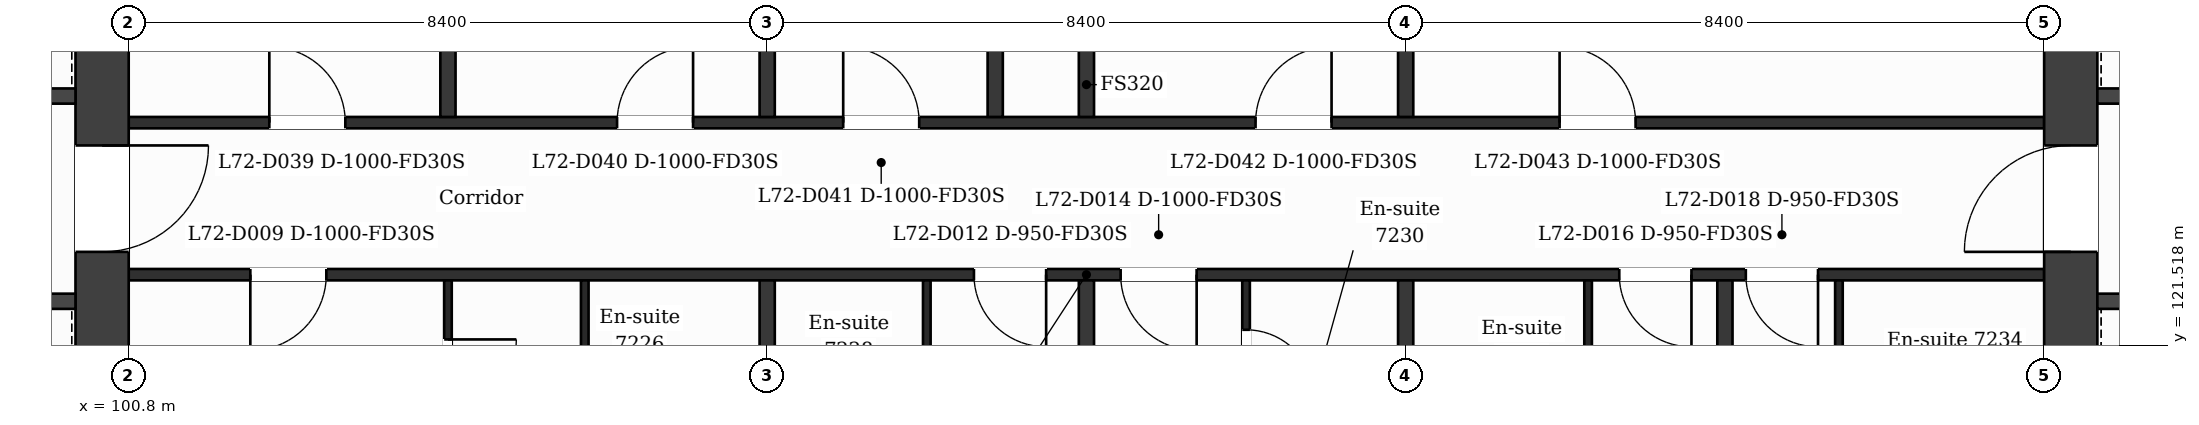
"""IFC4 building model, lengths in metres.
Left out: names, types, materials, properties, quantities, classifications, styles, units other than length and angle.
Written with IfcOpenShell. Run it as: python <this file> out.ifc"""

import sys

from ifc_helpers import new_model, si_unit, direction, frame, frame_2d, origin, place, context, subcontext, project, spatial, rectangle, extrude, element, fill, save


model = new_model("IFC4")
c1 = context("Model", 3, precision=1e-05, world=origin(), true_north=direction((0.0, 1.0)))
c2 = subcontext(c1, "Body", "Model", "MODEL_VIEW")
j1 = project(units=[si_unit("LENGTHUNIT", "METRE"), si_unit("PLANEANGLEUNIT", "RADIAN")], contexts=[c1])
p1 = place(None, origin())
s1 = spatial("IfcSite", under=j1, at=p1, CompositionType="ELEMENT")
p2 = place(p1, origin())
s2 = spatial("IfcBuilding", under=s1, at=p2, CompositionType="ELEMENT")
p3 = place(p2, frame((0.0, 0.0, 296.0)))
s3 = spatial("IfcBuildingStorey", under=s2, at=p3, CompositionType="ELEMENT", Elevation=296.0)
p4 = place(p3, frame((100.45, 132.05, 0.0), z_axis=(0.0, 0.0, 1.0), x_axis=(0.0, -1.0, 0.0)))
e1 = element("IfcWall", 1, at=p4, inside=s3, PredefinedType="SHEAR", context=c2, shape_type="SweptSolid", body=[
    extrude(rectangle(XDim=15.7, YDim=0.7, at=frame_2d((7.85, 0.0))), origin(), (0.0, 0.0, 1.0), 3.7),
])
p5 = place(p4, frame((7.9, 0.0, 0.0)))
e2 = element("IfcOpeningElement", 2, at=p5, cuts=e1, PredefinedType="OPENING", context=c2, shape_type="SweptSolid", body=[
    extrude(rectangle(XDim=1.4, YDim=2.1, at=frame_2d((0.7, 1.05))), frame((0.0, 0.36, 0.0), z_axis=(0.0, -1.0, 0.0), x_axis=(1.0, 0.0, 0.0)), (0.0, 0.0, 1.0), 0.72),
])
p6 = place(p3, frame((126.35, 116.35, 0.0), z_axis=(0.0, 0.0, 1.0), x_axis=(0.0, 1.0, 0.0)))
e3 = element("IfcWall", 3, at=p6, inside=s3, PredefinedType="SHEAR", context=c2, shape_type="SweptSolid", body=[
    extrude(rectangle(XDim=15.7, YDim=0.7, at=frame_2d((7.85, 0.0))), origin(), (0.0, 0.0, 1.0), 3.7),
])
p7 = place(p6, frame((6.4, 0.0, 0.0)))
e4 = element("IfcOpeningElement", 4, at=p7, cuts=e3, PredefinedType="OPENING", context=c2, shape_type="SweptSolid", body=[
    extrude(rectangle(XDim=1.4, YDim=2.1, at=frame_2d((0.7, 1.05))), frame((0.0, 0.36, 0.0), z_axis=(0.0, -1.0, 0.0), x_axis=(1.0, 0.0, 0.0)), (0.0, 0.0, 1.0), 0.72),
])
p8 = place(p3, frame((95.227, 122.1, 0.0), z_axis=(0.0, 0.0, 1.0), x_axis=(1.0, 0.0, 0.0)))
e5 = element("IfcWall", 5, at=p8, inside=s3, PredefinedType="PARTITIONING", context=c2, shape_type="SweptSolid", body=[
    extrude(rectangle(XDim=4.873, YDim=0.2, at=frame_2d((2.437, 0.0))), origin(), (0.0, 0.0, 1.0), 3.38),
])
p9 = place(p8, frame((0.732, 0.0, 0.0)))
e6 = element("IfcOpeningElement", 6, at=p9, cuts=e5, PredefinedType="OPENING", context=c2, shape_type="SweptSolid", body=[
    extrude(rectangle(XDim=1.1, YDim=2.1, at=frame_2d((0.55, 1.05))), frame((0.0, 0.11, 0.0), z_axis=(0.0, -1.0, 0.0), x_axis=(1.0, 0.0, 0.0)), (0.0, 0.0, 1.0), 0.22),
])
p10 = place(p8, frame((3.264, 0.0, 0.0)))
e7 = element("IfcOpeningElement", 7, at=p10, cuts=e5, PredefinedType="OPENING", context=c2, shape_type="SweptSolid", body=[
    extrude(rectangle(XDim=1.1, YDim=2.1, at=frame_2d((0.55, 1.05))), frame((0.0, 0.11, 0.0), z_axis=(0.0, -1.0, 0.0), x_axis=(1.0, 0.0, 0.0)), (0.0, 0.0, 1.0), 0.22),
])
p11 = place(p3, frame((126.7, 122.1, 0.0), z_axis=(0.0, 0.0, 1.0), x_axis=(1.0, 0.0, 0.0)))
e8 = element("IfcWall", 8, at=p11, inside=s3, PredefinedType="PARTITIONING", context=c2, shape_type="SweptSolid", body=[
    extrude(rectangle(XDim=4.873, YDim=0.2, at=frame_2d((2.437, 0.0))), origin(), (0.0, 0.0, 1.0), 3.38),
])
p12 = place(p11, frame((3.264, 0.0, 0.0)))
e9 = element("IfcOpeningElement", 9, at=p12, cuts=e8, PredefinedType="OPENING", context=c2, shape_type="SweptSolid", body=[
    extrude(rectangle(XDim=1.1, YDim=2.1, at=frame_2d((0.55, 1.05))), frame((0.0, 0.11, 0.0), z_axis=(0.0, -1.0, 0.0), x_axis=(1.0, 0.0, 0.0)), (0.0, 0.0, 1.0), 0.22),
])
p13 = place(p11, frame((0.827, 0.0, 0.0)))
e10 = element("IfcOpeningElement", 10, at=p13, cuts=e8, PredefinedType="OPENING", context=c2, shape_type="SweptSolid", body=[
    extrude(rectangle(XDim=1.1, YDim=2.1, at=frame_2d((0.55, 1.05))), frame((0.0, 0.11, 0.0), z_axis=(0.0, -1.0, 0.0), x_axis=(1.0, 0.0, 0.0)), (0.0, 0.0, 1.0), 0.22),
])
p14 = place(p3, frame((100.8, 122.45, 0.0), z_axis=(0.0, 0.0, 1.0), x_axis=(1.0, 0.0, 0.0)))
e11 = element("IfcWall", 11, at=p14, inside=s3, PredefinedType="PARTITIONING", context=c2, shape_type="SweptSolid", body=[
    extrude(rectangle(XDim=25.2, YDim=0.15, at=frame_2d((12.6, 0.0))), origin(), (0.0, 0.0, 1.0), 3.38),
])
p15 = place(p14, frame((1.6, 0.0, 0.0)))
e12 = element("IfcOpeningElement", 12, at=p15, cuts=e11, PredefinedType="OPENING", context=c2, shape_type="SweptSolid", body=[
    extrude(rectangle(XDim=1.0, YDim=2.1, at=frame_2d((0.5, 1.05))), frame((0.0, 0.085, 0.0), z_axis=(0.0, -1.0, 0.0), x_axis=(1.0, 0.0, 0.0)), (0.0, 0.0, 1.0), 0.17),
])
p16 = place(p14, frame((11.12, 0.0, 0.0)))
e13 = element("IfcOpeningElement", 13, at=p16, cuts=e11, PredefinedType="OPENING", context=c2, shape_type="SweptSolid", body=[
    extrude(rectangle(XDim=0.95, YDim=2.1, at=frame_2d((0.475, 1.05))), frame((0.0, 0.085, 0.0), z_axis=(0.0, -1.0, 0.0), x_axis=(1.0, 0.0, 0.0)), (0.0, 0.0, 1.0), 0.17),
])
p17 = place(p14, frame((13.05, 0.0, 0.0)))
e14 = element("IfcOpeningElement", 14, at=p17, cuts=e11, PredefinedType="OPENING", context=c2, shape_type="SweptSolid", body=[
    extrude(rectangle(XDim=1.0, YDim=2.1, at=frame_2d((0.5, 1.05))), frame((0.0, 0.085, 0.0), z_axis=(0.0, -1.0, 0.0), x_axis=(1.0, 0.0, 0.0)), (0.0, 0.0, 1.0), 0.17),
])
p18 = place(p14, frame((19.61, 0.0, 0.0)))
e15 = element("IfcOpeningElement", 15, at=p18, cuts=e11, PredefinedType="OPENING", context=c2, shape_type="SweptSolid", body=[
    extrude(rectangle(XDim=0.95, YDim=2.1, at=frame_2d((0.475, 1.05))), frame((0.0, 0.085, 0.0), z_axis=(0.0, -1.0, 0.0), x_axis=(1.0, 0.0, 0.0)), (0.0, 0.0, 1.0), 0.17),
])
p19 = place(p14, frame((21.275, 0.0, 0.0)))
e16 = element("IfcOpeningElement", 16, at=p19, cuts=e11, PredefinedType="OPENING", context=c2, shape_type="SweptSolid", body=[
    extrude(rectangle(XDim=0.95, YDim=2.1, at=frame_2d((0.475, 1.05))), frame((0.0, 0.085, 0.0), z_axis=(0.0, -1.0, 0.0), x_axis=(1.0, 0.0, 0.0)), (0.0, 0.0, 1.0), 0.17),
])
p20 = place(p3, frame((100.8, 124.45, 0.0), z_axis=(0.0, 0.0, 1.0), x_axis=(1.0, 0.0, 0.0)))
e17 = element("IfcWall", 17, at=p20, inside=s3, PredefinedType="PARTITIONING", context=c2, shape_type="SweptSolid", body=[
    extrude(rectangle(XDim=25.2, YDim=0.15, at=frame_2d((12.6, 0.0))), origin(), (0.0, 0.0, 1.0), 3.38),
])
p21 = place(p20, frame((1.85, 0.0, 0.0)))
e18 = element("IfcOpeningElement", 18, at=p21, cuts=e17, PredefinedType="OPENING", context=c2, shape_type="SweptSolid", body=[
    extrude(rectangle(XDim=1.0, YDim=2.1, at=frame_2d((0.5, 1.05))), frame((0.0, 0.085, 0.0), z_axis=(0.0, -1.0, 0.0), x_axis=(1.0, 0.0, 0.0)), (0.0, 0.0, 1.0), 0.17),
])
p22 = place(p20, frame((6.425, 0.0, 0.0)))
e19 = element("IfcOpeningElement", 19, at=p22, cuts=e17, PredefinedType="OPENING", context=c2, shape_type="SweptSolid", body=[
    extrude(rectangle(XDim=1.0, YDim=2.1, at=frame_2d((0.5, 1.05))), frame((0.0, 0.085, 0.0), z_axis=(0.0, -1.0, 0.0), x_axis=(1.0, 0.0, 0.0)), (0.0, 0.0, 1.0), 0.17),
])
p23 = place(p20, frame((9.4, 0.0, 0.0)))
e20 = element("IfcOpeningElement", 20, at=p23, cuts=e17, PredefinedType="OPENING", context=c2, shape_type="SweptSolid", body=[
    extrude(rectangle(XDim=1.0, YDim=2.1, at=frame_2d((0.5, 1.05))), frame((0.0, 0.085, 0.0), z_axis=(0.0, -1.0, 0.0), x_axis=(1.0, 0.0, 0.0)), (0.0, 0.0, 1.0), 0.17),
])
p24 = place(p20, frame((14.825, 0.0, 0.0)))
e21 = element("IfcOpeningElement", 21, at=p24, cuts=e17, PredefinedType="OPENING", context=c2, shape_type="SweptSolid", body=[
    extrude(rectangle(XDim=1.0, YDim=2.1, at=frame_2d((0.5, 1.05))), frame((0.0, 0.085, 0.0), z_axis=(0.0, -1.0, 0.0), x_axis=(1.0, 0.0, 0.0)), (0.0, 0.0, 1.0), 0.17),
])
p25 = place(p20, frame((18.825, 0.0, 0.0)))
e22 = element("IfcOpeningElement", 22, at=p25, cuts=e17, PredefinedType="OPENING", context=c2, shape_type="SweptSolid", body=[
    extrude(rectangle(XDim=1.0, YDim=2.1, at=frame_2d((0.5, 1.05))), frame((0.0, 0.085, 0.0), z_axis=(0.0, -1.0, 0.0), x_axis=(1.0, 0.0, 0.0)), (0.0, 0.0, 1.0), 0.17),
])
p26 = place(p3, frame((92.702, 124.8, 0.0), z_axis=(0.0, 0.0, 1.0), x_axis=(1.0, 0.0, 0.0)))
e23 = element("IfcWall", 23, at=p26, inside=s3, PredefinedType="PARTITIONING", context=c2, shape_type="SweptSolid", body=[
    extrude(rectangle(XDim=7.398, YDim=0.2, at=frame_2d((3.699, 0.0))), origin(), (0.0, 0.0, 1.0), 3.38),
])
p27 = place(p26, frame((5.48, 0.0, 0.0)))
e24 = element("IfcOpeningElement", 24, at=p27, cuts=e23, PredefinedType="OPENING", context=c2, shape_type="SweptSolid", body=[
    extrude(rectangle(XDim=1.1, YDim=2.1, at=frame_2d((0.55, 1.05))), frame((0.0, 0.11, 0.0), z_axis=(0.0, -1.0, 0.0), x_axis=(1.0, 0.0, 0.0)), (0.0, 0.0, 1.0), 0.22),
])
p28 = place(p3, frame((126.7, 124.8, 0.0), z_axis=(0.0, 0.0, 1.0), x_axis=(1.0, 0.0, 0.0)))
e25 = element("IfcWall", 25, at=p28, inside=s3, PredefinedType="PARTITIONING", context=c2, shape_type="SweptSolid", body=[
    extrude(rectangle(XDim=4.849, YDim=0.2, at=frame_2d((2.424, 0.0))), origin(), (0.0, 0.0, 1.0), 3.38),
])
p29 = place(p28, frame((0.818, 0.0, 0.0)))
e26 = element("IfcOpeningElement", 26, at=p29, cuts=e25, PredefinedType="OPENING", context=c2, shape_type="SweptSolid", body=[
    extrude(rectangle(XDim=1.1, YDim=2.1, at=frame_2d((0.55, 1.05))), frame((0.0, 0.11, 0.0), z_axis=(0.0, -1.0, 0.0), x_axis=(1.0, 0.0, 0.0)), (0.0, 0.0, 1.0), 0.22),
])
p30 = place(p3, frame((105.0, 117.79, 0.0), z_axis=(0.0, 0.0, 1.0), x_axis=(0.0, 1.0, 0.0)))
e27 = element("IfcWall", 27, at=p30, inside=s3, PredefinedType="PARTITIONING", context=c2, shape_type="SweptSolid", body=[
    extrude(rectangle(XDim=4.585, YDim=0.1, at=frame_2d((2.292, 0.0))), origin(), (0.0, 0.0, 1.0), 3.38),
])
p31 = place(p30, frame((2.908, 0.0, 0.0)))
e28 = element("IfcOpeningElement", 28, at=p31, cuts=e27, PredefinedType="OPENING", context=c2, shape_type="SweptSolid", body=[
    extrude(rectangle(XDim=0.9, YDim=2.1, at=frame_2d((0.45, 1.05))), frame((0.0, 0.06, 0.0), z_axis=(0.0, -1.0, 0.0), x_axis=(1.0, 0.0, 0.0)), (0.0, 0.0, 1.0), 0.12),
])
p32 = place(p3, frame((105.0, 124.525, 0.0), z_axis=(0.0, 0.0, 1.0), x_axis=(0.0, 1.0, 0.0)))
e29 = element("IfcWall", 29, at=p32, inside=s3, PredefinedType="PARTITIONING", context=c2, shape_type="SweptSolid", body=[
    extrude(rectangle(XDim=9.2, YDim=0.2, at=frame_2d((4.6, 0.0))), origin(), (0.0, 0.0, 1.0), 3.38),
])
p33 = place(p3, frame((106.8, 120.4, 0.0), z_axis=(0.0, 0.0, 1.0), x_axis=(0.0, 1.0, 0.0)))
e30 = element("IfcWall", 30, at=p33, inside=s3, PredefinedType="PARTITIONING", context=c2, shape_type="SweptSolid", body=[
    extrude(rectangle(XDim=1.975, YDim=0.1, at=frame_2d((0.988, 0.0))), origin(), (0.0, 0.0, 1.0), 3.38),
])
p34 = place(p3, frame((109.2, 117.79, 0.0), z_axis=(0.0, 0.0, 1.0), x_axis=(0.0, 1.0, 0.0)))
e31 = element("IfcWall", 31, at=p34, inside=s3, PredefinedType="PARTITIONING", context=c2, shape_type="SweptSolid", body=[
    extrude(rectangle(XDim=4.585, YDim=0.2, at=frame_2d((2.292, 0.0))), origin(), (0.0, 0.0, 1.0), 3.38),
])
p35 = place(p3, frame((109.2, 124.525, 0.0), z_axis=(0.0, 0.0, 1.0), x_axis=(0.0, 1.0, 0.0)))
e32 = element("IfcWall", 32, at=p35, inside=s3, PredefinedType="PARTITIONING", context=c2, shape_type="SweptSolid", body=[
    extrude(rectangle(XDim=9.2, YDim=0.2, at=frame_2d((4.6, 0.0))), origin(), (0.0, 0.0, 1.0), 3.38),
])
p36 = place(p3, frame((111.3, 120.4, 0.0), z_axis=(0.0, 0.0, 1.0), x_axis=(0.0, 1.0, 0.0)))
e33 = element("IfcWall", 33, at=p36, inside=s3, PredefinedType="PARTITIONING", context=c2, shape_type="SweptSolid", body=[
    extrude(rectangle(XDim=1.975, YDim=0.1, at=frame_2d((0.988, 0.0))), origin(), (0.0, 0.0, 1.0), 3.38),
])
p37 = place(p3, frame((112.2, 124.525, 0.0), z_axis=(0.0, 0.0, 1.0), x_axis=(0.0, 1.0, 0.0)))
e34 = element("IfcWall", 34, at=p37, inside=s3, PredefinedType="PARTITIONING", context=c2, shape_type="SweptSolid", body=[
    extrude(rectangle(XDim=5.825, YDim=0.2, at=frame_2d((2.913, 0.0))), origin(), (0.0, 0.0, 1.0), 3.38),
])
p38 = place(p3, frame((113.4, 117.79, 0.0), z_axis=(0.0, 0.0, 1.0), x_axis=(0.0, 1.0, 0.0)))
e35 = element("IfcWall", 35, at=p38, inside=s3, PredefinedType="PARTITIONING", context=c2, shape_type="SweptSolid", body=[
    extrude(rectangle(XDim=4.585, YDim=0.2, at=frame_2d((2.292, 0.0))), origin(), (0.0, 0.0, 1.0), 3.38),
])
p39 = place(p3, frame((113.4, 124.525, 0.0), z_axis=(0.0, 0.0, 1.0), x_axis=(0.0, 1.0, 0.0)))
e36 = element("IfcWall", 36, at=p39, inside=s3, PredefinedType="PARTITIONING", context=c2, shape_type="SweptSolid", body=[
    extrude(rectangle(XDim=9.2, YDim=0.2, at=frame_2d((4.6, 0.0))), origin(), (0.0, 0.0, 1.0), 3.38),
])
p40 = place(p3, frame((115.5, 120.4, 0.0), z_axis=(0.0, 0.0, 1.0), x_axis=(0.0, 1.0, 0.0)))
e37 = element("IfcWall", 37, at=p40, inside=s3, PredefinedType="PARTITIONING", context=c2, shape_type="SweptSolid", body=[
    extrude(rectangle(XDim=1.975, YDim=0.1, at=frame_2d((0.988, 0.0))), origin(), (0.0, 0.0, 1.0), 3.38),
])
p41 = place(p40, frame((0.425, 0.0, 0.0)))
e38 = element("IfcOpeningElement", 38, at=p41, cuts=e37, PredefinedType="OPENING", context=c2, shape_type="SweptSolid", body=[
    extrude(rectangle(XDim=0.9, YDim=2.1, at=frame_2d((0.45, 1.05))), frame((0.0, 0.06, 0.0), z_axis=(0.0, -1.0, 0.0), x_axis=(1.0, 0.0, 0.0)), (0.0, 0.0, 1.0), 0.12),
])
p42 = place(p3, frame((117.6, 117.79, 0.0), z_axis=(0.0, 0.0, 1.0), x_axis=(0.0, 1.0, 0.0)))
e39 = element("IfcWall", 39, at=p42, inside=s3, PredefinedType="PARTITIONING", context=c2, shape_type="SweptSolid", body=[
    extrude(rectangle(XDim=4.585, YDim=0.2, at=frame_2d((2.292, 0.0))), origin(), (0.0, 0.0, 1.0), 3.38),
])
p43 = place(p3, frame((117.6, 124.525, 0.0), z_axis=(0.0, 0.0, 1.0), x_axis=(0.0, 1.0, 0.0)))
e40 = element("IfcWall", 40, at=p43, inside=s3, PredefinedType="PARTITIONING", context=c2, shape_type="SweptSolid", body=[
    extrude(rectangle(XDim=9.2, YDim=0.2, at=frame_2d((4.6, 0.0))), origin(), (0.0, 0.0, 1.0), 3.38),
])
p44 = place(p3, frame((120.0, 120.4, 0.0), z_axis=(0.0, 0.0, 1.0), x_axis=(0.0, 1.0, 0.0)))
e41 = element("IfcWall", 41, at=p44, inside=s3, PredefinedType="PARTITIONING", context=c2, shape_type="SweptSolid", body=[
    extrude(rectangle(XDim=1.975, YDim=0.1, at=frame_2d((0.988, 0.0))), origin(), (0.0, 0.0, 1.0), 3.38),
])
p45 = place(p3, frame((121.8, 117.79, 0.0), z_axis=(0.0, 0.0, 1.0), x_axis=(0.0, 1.0, 0.0)))
e42 = element("IfcWall", 42, at=p45, inside=s3, PredefinedType="PARTITIONING", context=c2, shape_type="SweptSolid", body=[
    extrude(rectangle(XDim=4.585, YDim=0.2, at=frame_2d((2.292, 0.0))), origin(), (0.0, 0.0, 1.0), 3.38),
])
p46 = place(p3, frame((123.3, 120.1, 0.0), z_axis=(0.0, 0.0, 1.0), x_axis=(0.0, 1.0, 0.0)))
e43 = element("IfcWall", 43, at=p46, inside=s3, PredefinedType="PARTITIONING", context=c2, shape_type="SweptSolid", body=[
    extrude(rectangle(XDim=2.275, YDim=0.1, at=frame_2d((1.137, 0.0))), origin(), (0.0, 0.0, 1.0), 3.38),
])
p47 = place(p15, origin())
e44 = element("IfcDoor", 44, at=p47, inside=s3, OperationType="SINGLE_SWING_LEFT", PredefinedType="DOOR", context=c2, shape_type="SweptSolid", body=[
    extrude(rectangle(XDim=1.0, YDim=2.1, at=frame_2d((0.5, 1.05))), frame((0.0, 0.025, 0.0), z_axis=(0.0, -1.0, 0.0), x_axis=(1.0, 0.0, 0.0)), (0.0, 0.0, 1.0), 0.05),
])
fill(e12, e44)
p48 = place(p31, origin())
e45 = element("IfcDoor", 45, at=p48, inside=s3, OperationType="SINGLE_SWING_RIGHT", PredefinedType="DOOR", context=c2, shape_type="SweptSolid", body=[
    extrude(rectangle(XDim=0.9, YDim=2.1, at=frame_2d((0.45, 1.05))), frame((0.0, 0.025, 0.0), z_axis=(0.0, -1.0, 0.0), x_axis=(1.0, 0.0, 0.0)), (0.0, 0.0, 1.0), 0.05),
])
fill(e28, e45)
p49 = place(p16, origin())
e46 = element("IfcDoor", 46, at=p49, inside=s3, OperationType="SINGLE_SWING_RIGHT", PredefinedType="DOOR", context=c2, shape_type="SweptSolid", body=[
    extrude(rectangle(XDim=0.95, YDim=2.1, at=frame_2d((0.475, 1.05))), frame((0.0, 0.025, 0.0), z_axis=(0.0, -1.0, 0.0), x_axis=(1.0, 0.0, 0.0)), (0.0, 0.0, 1.0), 0.05),
])
fill(e13, e46)
p50 = place(p17, origin())
e47 = element("IfcDoor", 47, at=p50, inside=s3, OperationType="SINGLE_SWING_RIGHT", PredefinedType="DOOR", context=c2, shape_type="SweptSolid", body=[
    extrude(rectangle(XDim=1.0, YDim=2.1, at=frame_2d((0.5, 1.05))), frame((0.0, 0.025, 0.0), z_axis=(0.0, -1.0, 0.0), x_axis=(1.0, 0.0, 0.0)), (0.0, 0.0, 1.0), 0.05),
])
fill(e14, e47)
p51 = place(p41, origin())
e48 = element("IfcDoor", 48, at=p51, inside=s3, OperationType="SINGLE_SWING_LEFT", PredefinedType="DOOR", context=c2, shape_type="SweptSolid", body=[
    extrude(rectangle(XDim=0.9, YDim=2.1, at=frame_2d((0.45, 1.05))), frame((0.0, 0.025, 0.0), z_axis=(0.0, -1.0, 0.0), x_axis=(1.0, 0.0, 0.0)), (0.0, 0.0, 1.0), 0.05),
])
fill(e38, e48)
p52 = place(p18, origin())
e49 = element("IfcDoor", 49, at=p52, inside=s3, OperationType="SINGLE_SWING_RIGHT", PredefinedType="DOOR", context=c2, shape_type="SweptSolid", body=[
    extrude(rectangle(XDim=0.95, YDim=2.1, at=frame_2d((0.475, 1.05))), frame((0.0, 0.025, 0.0), z_axis=(0.0, -1.0, 0.0), x_axis=(1.0, 0.0, 0.0)), (0.0, 0.0, 1.0), 0.05),
])
fill(e15, e49)
p53 = place(p19, origin())
e50 = element("IfcDoor", 50, at=p53, inside=s3, OperationType="SINGLE_SWING_RIGHT", PredefinedType="DOOR", context=c2, shape_type="SweptSolid", body=[
    extrude(rectangle(XDim=0.95, YDim=2.1, at=frame_2d((0.475, 1.05))), frame((0.0, 0.025, 0.0), z_axis=(0.0, -1.0, 0.0), x_axis=(1.0, 0.0, 0.0)), (0.0, 0.0, 1.0), 0.05),
])
fill(e16, e50)
p54 = place(p21, origin())
e51 = element("IfcDoor", 51, at=p54, inside=s3, OperationType="SINGLE_SWING_LEFT", PredefinedType="DOOR", context=c2, shape_type="SweptSolid", body=[
    extrude(rectangle(XDim=1.0, YDim=2.1, at=frame_2d((0.5, 1.05))), frame((0.0, 0.025, 0.0), z_axis=(0.0, -1.0, 0.0), x_axis=(1.0, 0.0, 0.0)), (0.0, 0.0, 1.0), 0.05),
])
fill(e18, e51)
p55 = place(p22, origin())
e52 = element("IfcDoor", 52, at=p55, inside=s3, OperationType="SINGLE_SWING_RIGHT", PredefinedType="DOOR", context=c2, shape_type="SweptSolid", body=[
    extrude(rectangle(XDim=1.0, YDim=2.1, at=frame_2d((0.5, 1.05))), frame((0.0, 0.025, 0.0), z_axis=(0.0, -1.0, 0.0), x_axis=(1.0, 0.0, 0.0)), (0.0, 0.0, 1.0), 0.05),
])
fill(e19, e52)
p56 = place(p23, origin())
e53 = element("IfcDoor", 53, at=p56, inside=s3, OperationType="SINGLE_SWING_LEFT", PredefinedType="DOOR", context=c2, shape_type="SweptSolid", body=[
    extrude(rectangle(XDim=1.0, YDim=2.1, at=frame_2d((0.5, 1.05))), frame((0.0, 0.025, 0.0), z_axis=(0.0, -1.0, 0.0), x_axis=(1.0, 0.0, 0.0)), (0.0, 0.0, 1.0), 0.05),
])
fill(e20, e53)
p57 = place(p24, origin())
e54 = element("IfcDoor", 54, at=p57, inside=s3, OperationType="SINGLE_SWING_RIGHT", PredefinedType="DOOR", context=c2, shape_type="SweptSolid", body=[
    extrude(rectangle(XDim=1.0, YDim=2.1, at=frame_2d((0.5, 1.05))), frame((0.0, 0.025, 0.0), z_axis=(0.0, -1.0, 0.0), x_axis=(1.0, 0.0, 0.0)), (0.0, 0.0, 1.0), 0.05),
])
fill(e21, e54)
p58 = place(p25, origin())
e55 = element("IfcDoor", 55, at=p58, inside=s3, OperationType="SINGLE_SWING_LEFT", PredefinedType="DOOR", context=c2, shape_type="SweptSolid", body=[
    extrude(rectangle(XDim=1.0, YDim=2.1, at=frame_2d((0.5, 1.05))), frame((0.0, 0.025, 0.0), z_axis=(0.0, -1.0, 0.0), x_axis=(1.0, 0.0, 0.0)), (0.0, 0.0, 1.0), 0.05),
])
fill(e22, e55)
p59 = place(p5, origin())
e56 = element("IfcDoor", 56, at=p59, inside=s3, OperationType="SINGLE_SWING_LEFT", PredefinedType="DOOR", context=c2, shape_type="SweptSolid", body=[
    extrude(rectangle(XDim=1.4, YDim=2.1, at=frame_2d((0.7, 1.05))), frame((0.0, 0.025, 0.0), z_axis=(0.0, -1.0, 0.0), x_axis=(1.0, 0.0, 0.0)), (0.0, 0.0, 1.0), 0.05),
])
fill(e2, e56)
p60 = place(p7, origin())
e57 = element("IfcDoor", 57, at=p60, inside=s3, OperationType="SINGLE_SWING_LEFT", PredefinedType="DOOR", context=c2, shape_type="SweptSolid", body=[
    extrude(rectangle(XDim=1.4, YDim=2.1, at=frame_2d((0.7, 1.05))), frame((0.0, 0.025, 0.0), z_axis=(0.0, -1.0, 0.0), x_axis=(1.0, 0.0, 0.0)), (0.0, 0.0, 1.0), 0.05),
])
fill(e4, e57)
save(model, sys.argv[1])
